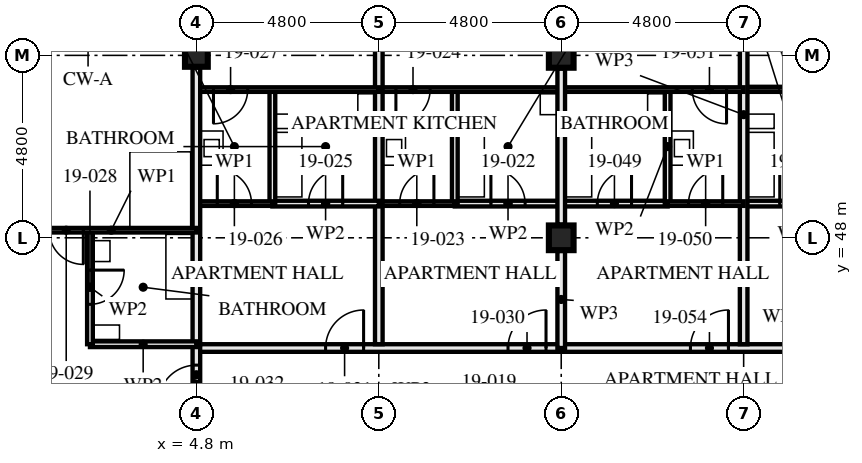
"""IFC4 building model, lengths in metres.
Left out: names, types, materials, properties, quantities, classifications, styles, units other than length and angle.
Written with IfcOpenShell. Run it as: python <this file> out.ifc"""

import sys

from ifc_helpers import new_model, si_unit, direction, frame, frame_2d, origin, origin_2d, place, context, subcontext, project, spatial, rectangle, hollow_rectangle, extrude, element, fill, save


model = new_model("IFC4")
c1 = context("Model", 3, precision=1e-05, world=origin(), true_north=direction((0.0, 1.0)))
c2 = subcontext(c1, "Body", "Model", "MODEL_VIEW")
j1 = project(units=[si_unit("LENGTHUNIT", "METRE"), si_unit("PLANEANGLEUNIT", "RADIAN")], contexts=[c1])
p1 = place(None, origin())
s1 = spatial("IfcSite", under=j1, at=p1, CompositionType="ELEMENT")
p2 = place(p1, origin())
s2 = spatial("IfcBuilding", under=s1, at=p2, CompositionType="ELEMENT")
p3 = place(p2, frame((0.0, 0.0, 72.5)))
s3 = spatial("IfcBuildingStorey", under=s2, at=p3, CompositionType="ELEMENT", Elevation=72.5)
p4 = place(p3, frame((4.8, 52.8, 0.0), z_axis=(0.0, 0.0, 1.0), x_axis=(0.0, 1.0, 0.0)))
e1 = element("IfcColumn", 1, at=p4, inside=s3, PredefinedType="COLUMN", context=c2, shape_type="SweptSolid", body=[
    extrude(hollow_rectangle(XDim=0.6, YDim=0.6, WallThickness=0.08, at=origin_2d()), origin(), (0.0, 0.0, 1.0), 3.5),
])
for number, where, z_axis, x_axis in (
    (2, (14.4, 48.0, 0.0), (0.0, 0.0, 1.0), (1.0, 0.0, 0.0)),
    (3, (14.4, 52.8, 0.0), (0.0, 0.0, 1.0), (1.0, 0.0, 0.0)),
):
    element("IfcColumn", number, at=place(p3, frame(where, z_axis=z_axis, x_axis=x_axis)), inside=s3, PredefinedType="COLUMN", context=c2, shape_type="SweptSolid", body=[
        extrude(hollow_rectangle(XDim=0.65, YDim=0.65, WallThickness=0.05, at=origin_2d()), origin(), (0.0, 0.0, 1.0), 3.5),
    ])
p5 = place(p3, frame((11.6, 51.9, 0.0), z_axis=(0.0, 0.0, 1.0), x_axis=(0.0, -1.0, 0.0)))
e4 = element("IfcWall", 4, at=p5, inside=s3, PredefinedType="PARTITIONING", context=c2, shape_type="SweptSolid", body=[
    extrude(rectangle(XDim=3.0, YDim=0.15, at=frame_2d((1.5, 0.0))), origin(), (0.0, 0.0, 1.0), 3.33),
])
p6 = place(p3, frame((14.4, 48.9, 0.0), z_axis=(0.0, 0.0, 1.0), x_axis=(-1.0, 0.0, 0.0)))
e5 = element("IfcWall", 5, at=p6, inside=s3, PredefinedType="PARTITIONING", context=c2, shape_type="SweptSolid", body=[
    extrude(rectangle(XDim=2.8, YDim=0.15, at=frame_2d((1.4, 0.0))), origin(), (0.0, 0.0, 1.0), 3.33),
])
p7 = place(p6, frame((0.95, 0.0, 0.0)))
e6 = element("IfcOpeningElement", 6, at=p7, cuts=e5, PredefinedType="OPENING", context=c2, shape_type="SweptSolid", body=[
    extrude(rectangle(XDim=0.9, YDim=2.1, at=frame_2d((0.45, 1.05))), frame((0.0, 0.085, 0.0), z_axis=(0.0, -1.0, 0.0), x_axis=(1.0, 0.0, 0.0)), (0.0, 0.0, 1.0), 0.171),
])
p8 = place(p3, frame((11.6, 48.9, 0.0), z_axis=(0.0, 0.0, 1.0), x_axis=(-1.0, 0.0, 0.0)))
e7 = element("IfcWall", 7, at=p8, inside=s3, PredefinedType="PARTITIONING", context=c2, shape_type="SweptSolid", body=[
    extrude(rectangle(XDim=2.0, YDim=0.12, at=frame_2d((1.0, 0.0))), origin(), (0.0, 0.0, 1.0), 3.33),
])
p9 = place(p8, frame((0.55, 0.0, 0.0)))
e8 = element("IfcOpeningElement", 8, at=p9, cuts=e7, PredefinedType="OPENING", context=c2, shape_type="SweptSolid", body=[
    extrude(rectangle(XDim=0.9, YDim=2.1, at=frame_2d((0.45, 1.05))), frame((0.0, 0.071, 0.0), z_axis=(0.0, -1.0, 0.0), x_axis=(1.0, 0.0, 0.0)), (0.0, 0.0, 1.0), 0.141),
])
p10 = place(p3, frame((14.4, 51.9, 0.0), z_axis=(0.0, 0.0, 1.0), x_axis=(-1.0, 0.0, 0.0)))
e9 = element("IfcWall", 9, at=p10, inside=s3, PredefinedType="PARTITIONING", context=c2, shape_type="SweptSolid", body=[
    extrude(rectangle(XDim=4.8, YDim=0.12, at=frame_2d((2.4, 0.0))), origin(), (0.0, 0.0, 1.0), 3.33),
])
p11 = place(p10, frame((3.45, 0.0, 0.0)))
e10 = element("IfcOpeningElement", 10, at=p11, cuts=e9, PredefinedType="OPENING", context=c2, shape_type="SweptSolid", body=[
    extrude(rectangle(XDim=0.9, YDim=2.1, at=frame_2d((0.45, 1.05))), frame((0.0, 0.071, 0.0), z_axis=(0.0, -1.0, 0.0), x_axis=(1.0, 0.0, 0.0)), (0.0, 0.0, 1.0), 0.141),
])
p12 = place(p3, frame((9.6, 57.28, 0.0), z_axis=(0.0, 0.0, 1.0), x_axis=(0.0, -1.0, 0.0)))
e11 = element("IfcWall", 11, at=p12, inside=s3, PredefinedType="PARTITIONING", context=c2, shape_type="SweptSolid", body=[
    extrude(rectangle(XDim=12.08, YDim=0.2, at=frame_2d((6.04, 0.0))), origin(), (0.0, 0.0, 1.0), 2.55),
])
p13 = place(p3, frame((6.8, 51.9, 0.0), z_axis=(0.0, 0.0, 1.0), x_axis=(0.0, -1.0, 0.0)))
e12 = element("IfcWall", 12, at=p13, inside=s3, PredefinedType="PARTITIONING", context=c2, shape_type="SweptSolid", body=[
    extrude(rectangle(XDim=3.0, YDim=0.15, at=frame_2d((1.5, 0.0))), origin(), (0.0, 0.0, 1.0), 3.33),
])
p14 = place(p3, frame((9.6, 48.9, 0.0), z_axis=(0.0, 0.0, 1.0), x_axis=(-1.0, 0.0, 0.0)))
e13 = element("IfcWall", 13, at=p14, inside=s3, PredefinedType="PARTITIONING", context=c2, shape_type="SweptSolid", body=[
    extrude(rectangle(XDim=2.8, YDim=0.15, at=frame_2d((1.4, 0.0))), origin(), (0.0, 0.0, 1.0), 3.33),
])
p15 = place(p14, frame((0.95, 0.0, 0.0)))
e14 = element("IfcOpeningElement", 14, at=p15, cuts=e13, PredefinedType="OPENING", context=c2, shape_type="SweptSolid", body=[
    extrude(rectangle(XDim=0.9, YDim=2.1, at=frame_2d((0.45, 1.05))), frame((0.0, 0.085, 0.0), z_axis=(0.0, -1.0, 0.0), x_axis=(1.0, 0.0, 0.0)), (0.0, 0.0, 1.0), 0.171),
])
p16 = place(p3, frame((6.8, 48.9, 0.0), z_axis=(0.0, 0.0, 1.0), x_axis=(-1.0, 0.0, 0.0)))
e15 = element("IfcWall", 15, at=p16, inside=s3, PredefinedType="PARTITIONING", context=c2, shape_type="SweptSolid", body=[
    extrude(rectangle(XDim=2.0, YDim=0.12, at=frame_2d((1.0, 0.0))), origin(), (0.0, 0.0, 1.0), 3.33),
])
p17 = place(p16, frame((0.55, 0.0, 0.0)))
e16 = element("IfcOpeningElement", 16, at=p17, cuts=e15, PredefinedType="OPENING", context=c2, shape_type="SweptSolid", body=[
    extrude(rectangle(XDim=0.9, YDim=2.1, at=frame_2d((0.45, 1.05))), frame((0.0, 0.071, 0.0), z_axis=(0.0, -1.0, 0.0), x_axis=(1.0, 0.0, 0.0)), (0.0, 0.0, 1.0), 0.141),
])
p18 = place(p3, frame((9.6, 51.9, 0.0), z_axis=(0.0, 0.0, 1.0), x_axis=(-1.0, 0.0, 0.0)))
e17 = element("IfcWall", 17, at=p18, inside=s3, PredefinedType="PARTITIONING", context=c2, shape_type="SweptSolid", body=[
    extrude(rectangle(XDim=4.8, YDim=0.12, at=frame_2d((2.4, 0.0))), origin(), (0.0, 0.0, 1.0), 3.33),
])
p19 = place(p18, frame((3.45, 0.0, 0.0)))
e18 = element("IfcOpeningElement", 18, at=p19, cuts=e17, PredefinedType="OPENING", context=c2, shape_type="SweptSolid", body=[
    extrude(rectangle(XDim=0.9, YDim=2.1, at=frame_2d((0.45, 1.05))), frame((0.0, 0.071, 0.0), z_axis=(0.0, -1.0, 0.0), x_axis=(1.0, 0.0, 0.0)), (0.0, 0.0, 1.0), 0.141),
])
p20 = place(p3, frame((4.8, 52.48, 0.0), z_axis=(0.0, 0.0, 1.0), x_axis=(0.0, -1.0, 0.0)))
e19 = element("IfcWall", 19, at=p20, inside=s3, PredefinedType="PARTITIONING", context=c2, shape_type="SweptSolid", body=[
    extrude(rectangle(XDim=7.28, YDim=0.2, at=frame_2d((3.64, 0.0))), origin(), (0.0, 0.0, 1.0), 2.55),
])
p21 = place(p3, frame((2.0, 48.2, 0.0), z_axis=(0.0, 0.0, 1.0), x_axis=(0.0, -1.0, 0.0)))
e20 = element("IfcWall", 20, at=p21, inside=s3, PredefinedType="PARTITIONING", context=c2, shape_type="SweptSolid", body=[
    extrude(rectangle(XDim=3.0, YDim=0.15, at=frame_2d((1.5, 0.0))), origin(), (0.0, 0.0, 1.0), 2.55),
])
p22 = place(p21, frame((1.05, 0.0, 0.0)))
e21 = element("IfcOpeningElement", 21, at=p22, cuts=e20, PredefinedType="OPENING", context=c2, shape_type="SweptSolid", body=[
    extrude(rectangle(XDim=0.9, YDim=2.1, at=frame_2d((0.45, 1.05))), frame((0.0, 0.085, 0.0), z_axis=(0.0, -1.0, 0.0), x_axis=(1.0, 0.0, 0.0)), (0.0, 0.0, 1.0), 0.171),
])
p23 = place(p3, frame((4.8, 45.2, 0.0), z_axis=(0.0, 0.0, 1.0), x_axis=(-1.0, 0.0, 0.0)))
e22 = element("IfcWall", 22, at=p23, inside=s3, PredefinedType="PARTITIONING", context=c2, shape_type="SweptSolid", body=[
    extrude(rectangle(XDim=2.8, YDim=0.15, at=frame_2d((1.4, 0.0))), origin(), (0.0, 0.0, 1.0), 3.33),
])
p24 = place(p3, frame((4.8, 48.2, 0.0), z_axis=(0.0, 0.0, 1.0), x_axis=(-1.0, 0.0, 0.0)))
e23 = element("IfcWall", 23, at=p24, inside=s3, PredefinedType="PARTITIONING", context=c2, shape_type="SweptSolid", body=[
    extrude(rectangle(XDim=4.48, YDim=0.12, at=frame_2d((2.24, 0.0))), origin(), (0.0, 0.0, 1.0), 3.33),
])
p25 = place(p24, frame((2.975, 0.0, 0.0)))
e24 = element("IfcOpeningElement", 24, at=p25, cuts=e23, PredefinedType="OPENING", context=c2, shape_type="SweptSolid", body=[
    extrude(rectangle(XDim=0.9, YDim=2.1, at=frame_2d((0.45, 1.05))), frame((0.0, 0.071, 0.0), z_axis=(0.0, -1.0, 0.0), x_axis=(1.0, 0.0, 0.0)), (0.0, 0.0, 1.0), 0.141),
])
p26 = place(p3, frame((14.4, 45.1, 0.0), z_axis=(0.0, 0.0, 1.0), x_axis=(-1.0, 0.0, 0.0)))
e25 = element("IfcWall", 25, at=p26, inside=s3, PredefinedType="PARTITIONING", context=c2, shape_type="SweptSolid", body=[
    extrude(rectangle(XDim=9.6, YDim=0.2, at=frame_2d((4.8, 0.0))), origin(), (0.0, 0.0, 1.0), 3.33),
])
p27 = place(p26, frame((0.4, 0.0, 0.0)))
e26 = element("IfcOpeningElement", 26, at=p27, cuts=e25, PredefinedType="OPENING", context=c2, shape_type="SweptSolid", body=[
    extrude(rectangle(XDim=1.0, YDim=2.1, at=frame_2d((0.5, 1.05))), frame((0.0, 0.111, 0.0), z_axis=(0.0, -1.0, 0.0), x_axis=(1.0, 0.0, 0.0)), (0.0, 0.0, 1.0), 0.221),
])
p28 = place(p26, frame((5.2, 0.0, 0.0)))
e27 = element("IfcOpeningElement", 27, at=p28, cuts=e25, PredefinedType="OPENING", context=c2, shape_type="SweptSolid", body=[
    extrude(rectangle(XDim=1.0, YDim=2.1, at=frame_2d((0.5, 1.05))), frame((0.0, 0.111, 0.0), z_axis=(0.0, -1.0, 0.0), x_axis=(1.0, 0.0, 0.0)), (0.0, 0.0, 1.0), 0.221),
])
p29 = place(p3, frame((4.8, 45.2, 0.0), z_axis=(0.0, 0.0, 1.0), x_axis=(0.0, -1.0, 0.0)))
e28 = element("IfcWall", 28, at=p29, inside=s3, PredefinedType="PARTITIONING", context=c2, shape_type="SweptSolid", body=[
    extrude(rectangle(XDim=1.605, YDim=0.2, at=frame_2d((0.802, 0.0))), origin(), (0.0, 0.0, 1.0), 3.33),
])
p30 = place(p29, frame((0.55, 0.0, 0.0)))
e29 = element("IfcOpeningElement", 29, at=p30, cuts=e28, PredefinedType="OPENING", context=c2, shape_type="SweptSolid", body=[
    extrude(rectangle(XDim=1.0, YDim=2.1, at=frame_2d((0.5, 1.05))), frame((0.0, 0.111, 0.0), z_axis=(0.0, -1.0, 0.0), x_axis=(1.0, 0.0, 0.0)), (0.0, 0.0, 1.0), 0.221),
])
p31 = place(p3, frame((22.0, 48.9, 0.0), z_axis=(0.0, 0.0, 1.0), x_axis=(-1.0, 0.0, 0.0)))
e30 = element("IfcWall", 30, at=p31, inside=s3, PredefinedType="PARTITIONING", context=c2, shape_type="SweptSolid", body=[
    extrude(rectangle(XDim=2.8, YDim=0.15, at=frame_2d((1.4, 0.0))), origin(), (0.0, 0.0, 1.0), 3.33),
])
p32 = place(p31, frame((0.95, 0.0, 0.0)))
e31 = element("IfcOpeningElement", 31, at=p32, cuts=e30, PredefinedType="OPENING", context=c2, shape_type="SweptSolid", body=[
    extrude(rectangle(XDim=0.9, YDim=2.1, at=frame_2d((0.45, 1.05))), frame((0.0, 0.085, 0.0), z_axis=(0.0, -1.0, 0.0), x_axis=(1.0, 0.0, 0.0)), (0.0, 0.0, 1.0), 0.171),
])
p33 = place(p3, frame((24.0, 51.9, 0.0), z_axis=(0.0, 0.0, 1.0), x_axis=(-1.0, 0.0, 0.0)))
e32 = element("IfcWall", 32, at=p33, inside=s3, PredefinedType="PARTITIONING", context=c2, shape_type="SweptSolid", body=[
    extrude(rectangle(XDim=4.8, YDim=0.12, at=frame_2d((2.4, 0.0))), origin(), (0.0, 0.0, 1.0), 3.33),
])
p34 = place(p33, frame((0.45, 0.0, 0.0)))
e33 = element("IfcOpeningElement", 33, at=p34, cuts=e32, PredefinedType="OPENING", context=c2, shape_type="SweptSolid", body=[
    extrude(rectangle(XDim=0.9, YDim=2.1, at=frame_2d((0.45, 1.05))), frame((0.0, 0.071, 0.0), z_axis=(0.0, -1.0, 0.0), x_axis=(1.0, 0.0, 0.0)), (0.0, 0.0, 1.0), 0.141),
])
p35 = place(p3, frame((19.2, 57.28, 0.0), z_axis=(0.0, 0.0, 1.0), x_axis=(0.0, -1.0, 0.0)))
e34 = element("IfcWall", 34, at=p35, inside=s3, PredefinedType="PARTITIONING", context=c2, shape_type="SweptSolid", body=[
    extrude(rectangle(XDim=12.08, YDim=0.2, at=frame_2d((6.04, 0.0))), origin(), (0.0, 0.0, 1.0), 2.55),
])
p36 = place(p3, frame((17.2, 51.9, 0.0), z_axis=(0.0, 0.0, 1.0), x_axis=(0.0, -1.0, 0.0)))
e35 = element("IfcWall", 35, at=p36, inside=s3, PredefinedType="PARTITIONING", context=c2, shape_type="SweptSolid", body=[
    extrude(rectangle(XDim=3.0, YDim=0.15, at=frame_2d((1.5, 0.0))), origin(), (0.0, 0.0, 1.0), 3.33),
])
p37 = place(p3, frame((17.2, 48.9, 0.0), z_axis=(0.0, 0.0, 1.0), x_axis=(-1.0, 0.0, 0.0)))
e36 = element("IfcWall", 36, at=p37, inside=s3, PredefinedType="PARTITIONING", context=c2, shape_type="SweptSolid", body=[
    extrude(rectangle(XDim=2.8, YDim=0.15, at=frame_2d((1.4, 0.0))), origin(), (0.0, 0.0, 1.0), 3.33),
])
p38 = place(p37, frame((0.95, 0.0, 0.0)))
e37 = element("IfcOpeningElement", 37, at=p38, cuts=e36, PredefinedType="OPENING", context=c2, shape_type="SweptSolid", body=[
    extrude(rectangle(XDim=0.9, YDim=2.1, at=frame_2d((0.45, 1.05))), frame((0.0, 0.085, 0.0), z_axis=(0.0, -1.0, 0.0), x_axis=(1.0, 0.0, 0.0)), (0.0, 0.0, 1.0), 0.171),
])
p39 = place(p3, frame((19.2, 48.9, 0.0), z_axis=(0.0, 0.0, 1.0), x_axis=(-1.0, 0.0, 0.0)))
e38 = element("IfcWall", 38, at=p39, inside=s3, PredefinedType="PARTITIONING", context=c2, shape_type="SweptSolid", body=[
    extrude(rectangle(XDim=2.0, YDim=0.12, at=frame_2d((1.0, 0.0))), origin(), (0.0, 0.0, 1.0), 3.33),
])
p40 = place(p39, frame((0.55, 0.0, 0.0)))
e39 = element("IfcOpeningElement", 39, at=p40, cuts=e38, PredefinedType="OPENING", context=c2, shape_type="SweptSolid", body=[
    extrude(rectangle(XDim=0.9, YDim=2.1, at=frame_2d((0.45, 1.05))), frame((0.0, 0.071, 0.0), z_axis=(0.0, -1.0, 0.0), x_axis=(1.0, 0.0, 0.0)), (0.0, 0.0, 1.0), 0.141),
])
p41 = place(p3, frame((19.2, 51.9, 0.0), z_axis=(0.0, 0.0, 1.0), x_axis=(-1.0, 0.0, 0.0)))
e40 = element("IfcWall", 40, at=p41, inside=s3, PredefinedType="PARTITIONING", context=c2, shape_type="SweptSolid", body=[
    extrude(rectangle(XDim=4.8, YDim=0.12, at=frame_2d((2.4, 0.0))), origin(), (0.0, 0.0, 1.0), 3.33),
])
p42 = place(p41, frame((0.45, 0.0, 0.0)))
e41 = element("IfcOpeningElement", 41, at=p42, cuts=e40, PredefinedType="OPENING", context=c2, shape_type="SweptSolid", body=[
    extrude(rectangle(XDim=0.9, YDim=2.1, at=frame_2d((0.45, 1.05))), frame((0.0, 0.071, 0.0), z_axis=(0.0, -1.0, 0.0), x_axis=(1.0, 0.0, 0.0)), (0.0, 0.0, 1.0), 0.141),
])
p43 = place(p3, frame((28.8, 45.1, 0.0), z_axis=(0.0, 0.0, 1.0), x_axis=(-1.0, 0.0, 0.0)))
e42 = element("IfcWall", 42, at=p43, inside=s3, PredefinedType="PARTITIONING", context=c2, shape_type="SweptSolid", body=[
    extrude(rectangle(XDim=14.4, YDim=0.2, at=frame_2d((7.2, 0.0))), origin(), (0.0, 0.0, 1.0), 3.33),
])
p44 = place(p43, frame((0.4, 0.0, 0.0)))
e43 = element("IfcOpeningElement", 43, at=p44, cuts=e42, PredefinedType="OPENING", context=c2, shape_type="SweptSolid", body=[
    extrude(rectangle(XDim=1.0, YDim=2.1, at=frame_2d((0.5, 1.05))), frame((0.0, 0.111, 0.0), z_axis=(0.0, -1.0, 0.0), x_axis=(1.0, 0.0, 0.0)), (0.0, 0.0, 1.0), 0.221),
])
p45 = place(p43, frame((5.2, 0.0, 0.0)))
e44 = element("IfcOpeningElement", 44, at=p45, cuts=e42, PredefinedType="OPENING", context=c2, shape_type="SweptSolid", body=[
    extrude(rectangle(XDim=1.0, YDim=2.1, at=frame_2d((0.5, 1.05))), frame((0.0, 0.111, 0.0), z_axis=(0.0, -1.0, 0.0), x_axis=(1.0, 0.0, 0.0)), (0.0, 0.0, 1.0), 0.221),
])
p46 = place(p43, frame((10.0, 0.0, 0.0)))
e45 = element("IfcOpeningElement", 45, at=p46, cuts=e42, PredefinedType="OPENING", context=c2, shape_type="SweptSolid", body=[
    extrude(rectangle(XDim=1.0, YDim=2.1, at=frame_2d((0.5, 1.05))), frame((0.0, 0.111, 0.0), z_axis=(0.0, -1.0, 0.0), x_axis=(1.0, 0.0, 0.0)), (0.0, 0.0, 1.0), 0.221),
])
p47 = place(p3, frame((14.4, 45.1, 0.0), z_axis=(0.0, 0.0, 1.0), x_axis=(0.0, 1.0, 0.0)))
e46 = element("IfcWall", 46, at=p47, inside=s3, PredefinedType="PARTITIONING", context=c2, shape_type="SweptSolid", body=[
    extrude(rectangle(XDim=2.555, YDim=0.2, at=frame_2d((1.277, 0.0))), origin(), (0.0, 0.0, 1.0), 2.32),
])
p48 = place(p3, frame((14.4, 48.345, 0.0), z_axis=(0.0, 0.0, 1.0), x_axis=(0.0, 1.0, 0.0)))
e47 = element("IfcWall", 47, at=p48, inside=s3, PredefinedType="PARTITIONING", context=c2, shape_type="SweptSolid", body=[
    extrude(rectangle(XDim=4.11, YDim=0.2, at=frame_2d((2.055, 0.0))), origin(), (0.0, 0.0, 1.0), 2.32),
])
p49 = place(p7, frame((0.9, 0.0, 0.0), z_axis=(0.0, 0.0, 1.0), x_axis=(-1.0, 0.0, 0.0)))
e48 = element("IfcDoor", 48, at=p49, inside=s3, OperationType="SINGLE_SWING_RIGHT", PredefinedType="DOOR", context=c2, shape_type="SweptSolid", body=[
    extrude(rectangle(XDim=0.9, YDim=2.1, at=frame_2d((0.45, 1.05))), frame((0.0, 0.022, 0.0), z_axis=(0.0, -1.0, 0.0), x_axis=(1.0, 0.0, 0.0)), (0.0, 0.0, 1.0), 0.044),
])
fill(e6, e48)
p50 = place(p9, frame((0.9, 0.0, 0.0), z_axis=(0.0, 0.0, 1.0), x_axis=(-1.0, 0.0, 0.0)))
e49 = element("IfcDoor", 49, at=p50, inside=s3, OperationType="SINGLE_SWING_LEFT", PredefinedType="DOOR", context=c2, shape_type="SweptSolid", body=[
    extrude(rectangle(XDim=0.9, YDim=2.1, at=frame_2d((0.45, 1.05))), frame((0.0, 0.022, 0.0), z_axis=(0.0, -1.0, 0.0), x_axis=(1.0, 0.0, 0.0)), (0.0, 0.0, 1.0), 0.044),
])
fill(e8, e49)
p51 = place(p11, origin())
e50 = element("IfcDoor", 50, at=p51, inside=s3, OperationType="SINGLE_SWING_LEFT", PredefinedType="DOOR", context=c2, shape_type="SweptSolid", body=[
    extrude(rectangle(XDim=0.9, YDim=2.1, at=frame_2d((0.45, 1.05))), frame((0.0, 0.022, 0.0), z_axis=(0.0, -1.0, 0.0), x_axis=(1.0, 0.0, 0.0)), (0.0, 0.0, 1.0), 0.044),
])
fill(e10, e50)
p52 = place(p15, frame((0.9, 0.0, 0.0), z_axis=(0.0, 0.0, 1.0), x_axis=(-1.0, 0.0, 0.0)))
e51 = element("IfcDoor", 51, at=p52, inside=s3, OperationType="SINGLE_SWING_LEFT", PredefinedType="DOOR", context=c2, shape_type="SweptSolid", body=[
    extrude(rectangle(XDim=0.9, YDim=2.1, at=frame_2d((0.45, 1.05))), frame((0.0, 0.022, 0.0), z_axis=(0.0, -1.0, 0.0), x_axis=(1.0, 0.0, 0.0)), (0.0, 0.0, 1.0), 0.044),
])
fill(e14, e51)
p53 = place(p17, frame((0.9, 0.0, 0.0), z_axis=(0.0, 0.0, 1.0), x_axis=(-1.0, 0.0, 0.0)))
e52 = element("IfcDoor", 52, at=p53, inside=s3, OperationType="SINGLE_SWING_RIGHT", PredefinedType="DOOR", context=c2, shape_type="SweptSolid", body=[
    extrude(rectangle(XDim=0.9, YDim=2.1, at=frame_2d((0.45, 1.05))), frame((0.0, 0.022, 0.0), z_axis=(0.0, -1.0, 0.0), x_axis=(1.0, 0.0, 0.0)), (0.0, 0.0, 1.0), 0.044),
])
fill(e16, e52)
p54 = place(p19, origin())
e53 = element("IfcDoor", 53, at=p54, inside=s3, OperationType="SINGLE_SWING_LEFT", PredefinedType="DOOR", context=c2, shape_type="SweptSolid", body=[
    extrude(rectangle(XDim=0.9, YDim=2.1, at=frame_2d((0.45, 1.05))), frame((0.0, 0.022, 0.0), z_axis=(0.0, -1.0, 0.0), x_axis=(1.0, 0.0, 0.0)), (0.0, 0.0, 1.0), 0.044),
])
fill(e18, e53)
p55 = place(p22, origin())
e54 = element("IfcDoor", 54, at=p55, inside=s3, OperationType="SINGLE_SWING_RIGHT", PredefinedType="DOOR", context=c2, shape_type="SweptSolid", body=[
    extrude(rectangle(XDim=0.9, YDim=2.1, at=frame_2d((0.45, 1.05))), frame((0.0, 0.022, 0.0), z_axis=(0.0, -1.0, 0.0), x_axis=(1.0, 0.0, 0.0)), (0.0, 0.0, 1.0), 0.044),
])
fill(e21, e54)
p56 = place(p25, origin())
e55 = element("IfcDoor", 55, at=p56, inside=s3, OperationType="SINGLE_SWING_RIGHT", PredefinedType="DOOR", context=c2, shape_type="SweptSolid", body=[
    extrude(rectangle(XDim=0.9, YDim=2.1, at=frame_2d((0.45, 1.05))), frame((0.0, 0.022, 0.0), z_axis=(0.0, -1.0, 0.0), x_axis=(1.0, 0.0, 0.0)), (0.0, 0.0, 1.0), 0.044),
])
fill(e24, e55)
p57 = place(p27, frame((1.0, 0.0, 0.0), z_axis=(0.0, 0.0, 1.0), x_axis=(-1.0, 0.0, 0.0)))
e56 = element("IfcDoor", 56, at=p57, inside=s3, OperationType="SINGLE_SWING_LEFT", PredefinedType="DOOR", context=c2, shape_type="SweptSolid", body=[
    extrude(rectangle(XDim=1.0, YDim=2.1, at=frame_2d((0.5, 1.05))), frame((0.0, 0.027, 0.0), z_axis=(0.0, -1.0, 0.0), x_axis=(1.0, 0.0, 0.0)), (0.0, 0.0, 1.0), 0.054),
])
fill(e26, e56)
p58 = place(p28, frame((1.0, 0.0, 0.0), z_axis=(0.0, 0.0, 1.0), x_axis=(-1.0, 0.0, 0.0)))
e57 = element("IfcDoor", 57, at=p58, inside=s3, OperationType="SINGLE_SWING_LEFT", PredefinedType="DOOR", context=c2, shape_type="SweptSolid", body=[
    extrude(rectangle(XDim=1.0, YDim=2.1, at=frame_2d((0.5, 1.05))), frame((0.0, 0.027, 0.0), z_axis=(0.0, -1.0, 0.0), x_axis=(1.0, 0.0, 0.0)), (0.0, 0.0, 1.0), 0.054),
])
fill(e27, e57)
p59 = place(p30, frame((1.0, 0.0, 0.0), z_axis=(0.0, 0.0, 1.0), x_axis=(-1.0, 0.0, 0.0)))
e58 = element("IfcDoor", 58, at=p59, inside=s3, OperationType="SINGLE_SWING_RIGHT", PredefinedType="DOOR", context=c2, shape_type="SweptSolid", body=[
    extrude(rectangle(XDim=1.0, YDim=2.1, at=frame_2d((0.5, 1.05))), frame((0.0, 0.027, 0.0), z_axis=(0.0, -1.0, 0.0), x_axis=(1.0, 0.0, 0.0)), (0.0, 0.0, 1.0), 0.054),
])
fill(e29, e58)
p60 = place(p32, frame((0.9, 0.0, 0.0), z_axis=(0.0, 0.0, 1.0), x_axis=(-1.0, 0.0, 0.0)))
e59 = element("IfcDoor", 59, at=p60, inside=s3, OperationType="SINGLE_SWING_RIGHT", PredefinedType="DOOR", context=c2, shape_type="SweptSolid", body=[
    extrude(rectangle(XDim=0.9, YDim=2.1, at=frame_2d((0.45, 1.05))), frame((0.0, 0.022, 0.0), z_axis=(0.0, -1.0, 0.0), x_axis=(1.0, 0.0, 0.0)), (0.0, 0.0, 1.0), 0.044),
])
fill(e31, e59)
p61 = place(p38, frame((0.9, 0.0, 0.0), z_axis=(0.0, 0.0, 1.0), x_axis=(-1.0, 0.0, 0.0)))
e60 = element("IfcDoor", 60, at=p61, inside=s3, OperationType="SINGLE_SWING_LEFT", PredefinedType="DOOR", context=c2, shape_type="SweptSolid", body=[
    extrude(rectangle(XDim=0.9, YDim=2.1, at=frame_2d((0.45, 1.05))), frame((0.0, 0.022, 0.0), z_axis=(0.0, -1.0, 0.0), x_axis=(1.0, 0.0, 0.0)), (0.0, 0.0, 1.0), 0.044),
])
fill(e37, e60)
p62 = place(p40, frame((0.9, 0.0, 0.0), z_axis=(0.0, 0.0, 1.0), x_axis=(-1.0, 0.0, 0.0)))
e61 = element("IfcDoor", 61, at=p62, inside=s3, OperationType="SINGLE_SWING_LEFT", PredefinedType="DOOR", context=c2, shape_type="SweptSolid", body=[
    extrude(rectangle(XDim=0.9, YDim=2.1, at=frame_2d((0.45, 1.05))), frame((0.0, 0.022, 0.0), z_axis=(0.0, -1.0, 0.0), x_axis=(1.0, 0.0, 0.0)), (0.0, 0.0, 1.0), 0.044),
])
fill(e39, e61)
p63 = place(p42, origin())
e62 = element("IfcDoor", 62, at=p63, inside=s3, OperationType="SINGLE_SWING_RIGHT", PredefinedType="DOOR", context=c2, shape_type="SweptSolid", body=[
    extrude(rectangle(XDim=0.9, YDim=2.1, at=frame_2d((0.45, 1.05))), frame((0.0, 0.022, 0.0), z_axis=(0.0, -1.0, 0.0), x_axis=(1.0, 0.0, 0.0)), (0.0, 0.0, 1.0), 0.044),
])
fill(e41, e62)
p64 = place(p46, frame((1.0, 0.0, 0.0), z_axis=(0.0, 0.0, 1.0), x_axis=(-1.0, 0.0, 0.0)))
e63 = element("IfcDoor", 63, at=p64, inside=s3, OperationType="SINGLE_SWING_LEFT", PredefinedType="DOOR", context=c2, shape_type="SweptSolid", body=[
    extrude(rectangle(XDim=1.0, YDim=2.1, at=frame_2d((0.5, 1.05))), frame((0.0, 0.027, 0.0), z_axis=(0.0, -1.0, 0.0), x_axis=(1.0, 0.0, 0.0)), (0.0, 0.0, 1.0), 0.054),
])
fill(e45, e63)
save(model, sys.argv[1])
